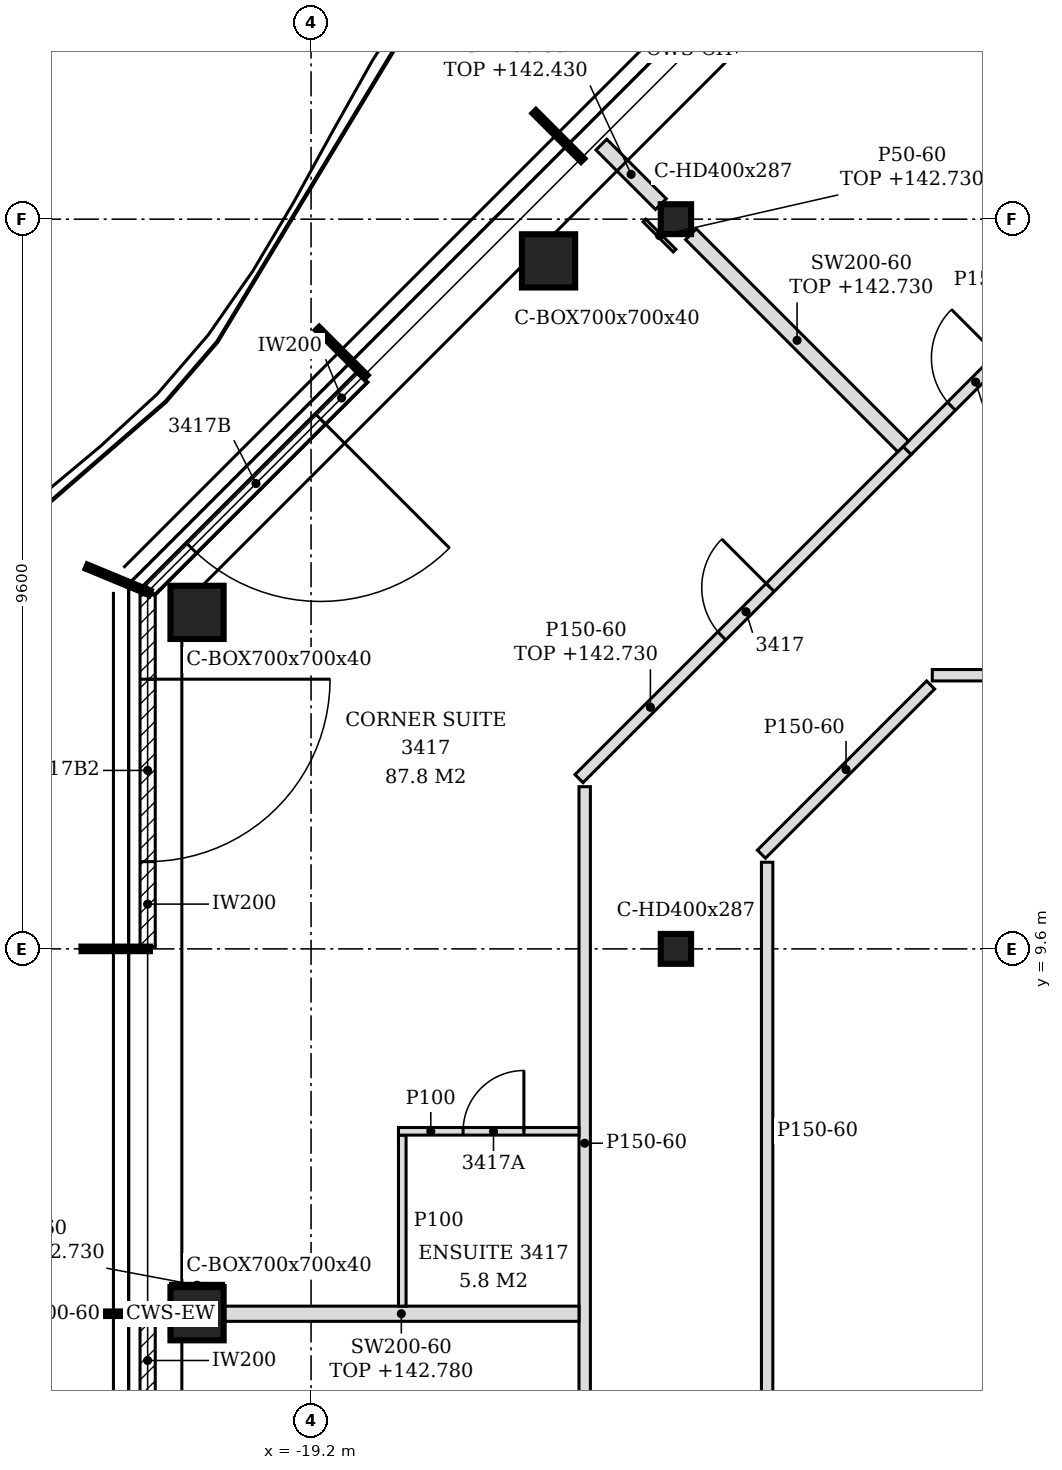
"""IFC4 building model, lengths in metres.
Left out: names, types, materials, properties, quantities, classifications, styles, units other than length and angle.
Written with IfcOpenShell. Run it as: python <this file> out.ifc"""

import sys

from ifc_helpers import new_model, si_unit, direction, frame, frame_2d, origin, origin_2d, place, context, subcontext, project, spatial, polyline, rectangle, hollow_rectangle, i_section, outline, extrude, element, fill, save


model = new_model("IFC4")
c1 = context("Model", 3, precision=1e-05, world=origin(), true_north=direction((0.0, 1.0)))
c2 = subcontext(c1, "Body", "Model", "MODEL_VIEW")
j1 = project(units=[si_unit("LENGTHUNIT", "METRE"), si_unit("PLANEANGLEUNIT", "RADIAN")], contexts=[c1])
p1 = place(None, origin())
s1 = spatial("IfcSite", under=j1, at=p1, CompositionType="ELEMENT")
p2 = place(p1, origin())
s2 = spatial("IfcBuilding", under=s1, at=p2, CompositionType="ELEMENT")
p3 = place(p2, frame((0.0, 0.0, 139.8)))
s3 = spatial("IfcBuildingStorey", under=s2, at=p3, CompositionType="ELEMENT", Elevation=139.8)
for number, where, z_axis, x_axis in (
    (1, (-16.076, 18.652, -0.15), (0.0, 0.0, 1.0), (1.0, 0.0, 0.0)),
    (2, (-20.7, 14.027, -0.15), (0.0, 0.0, 1.0), (1.0, 0.0, 0.0)),
    (3, (-20.7, 4.8, -0.15), (0.0, 0.0, 1.0), (1.0, 0.0, 0.0)),
):
    element("IfcColumn", number, at=place(p3, frame(where, z_axis=z_axis, x_axis=x_axis)), inside=s3, PredefinedType="COLUMN", context=c2, shape_type="SweptSolid", body=[
        extrude(hollow_rectangle(XDim=0.7, YDim=0.7, WallThickness=0.04, at=origin_2d()), origin(), (0.0, 0.0, 1.0), 3.6),
    ])
for number, where, z_axis, x_axis in (
    (4, (-14.4, 9.6, -0.15), (0.0, 0.0, 1.0), (1.0, 0.0, 0.0)),
    (5, (-14.4, 19.2, -0.15), (0.0, 0.0, 1.0), (1.0, 0.0, 0.0)),
):
    element("IfcColumn", number, at=place(p3, frame(where, z_axis=z_axis, x_axis=x_axis)), inside=s3, PredefinedType="COLUMN", context=c2, shape_type="SweptSolid", body=[
        extrude(i_section(OverallWidth=0.399, OverallDepth=0.393, WebThickness=0.023, FlangeThickness=0.037, FilletRadius=0.015, at=origin_2d()), origin(), (0.0, 0.0, 1.0), 3.6),
    ])
p4 = place(p3, frame((-18.521, 17.126, 0.0), z_axis=(0.0, 0.0, 1.0), x_axis=(-0.707106781187, -0.707106781187, 0.0)))
e6 = element("IfcWall", 6, at=p4, inside=s3, PredefinedType="NOTDEFINED", context=c2, shape_type="SweptSolid", body=[
    extrude(rectangle(XDim=3.962, YDim=0.2, at=frame_2d((1.981, 0.0))), origin(), (0.0, 0.0, 1.0), 3.45),
])
p5 = place(p4, frame((0.786, 0.0, 0.0)))
e7 = element("IfcOpeningElement", 7, at=p5, cuts=e6, PredefinedType="OPENING", context=c2, shape_type="SweptSolid", body=[
    extrude(rectangle(XDim=2.4, YDim=2.4, at=frame_2d((1.2, 1.2))), frame((0.0, 0.11, 0.0), z_axis=(0.0, -1.0, 0.0), x_axis=(1.0, 0.0, 0.0)), (0.0, 0.0, 1.0), 0.22),
])
p6 = place(p3, frame((-21.35, 14.256, 0.0), z_axis=(0.0, 0.0, 1.0), x_axis=(0.0, -1.0, 0.0)))
e8 = element("IfcWall", 8, at=p6, inside=s3, PredefinedType="NOTDEFINED", context=c2, shape_type="SweptSolid", body=[
    extrude(rectangle(XDim=4.626, YDim=0.2, at=frame_2d((2.313, 0.0))), origin(), (0.0, 0.0, 1.0), 3.45),
])
p7 = place(p6, frame((1.108, 0.0, 0.0)))
e9 = element("IfcOpeningElement", 9, at=p7, cuts=e8, PredefinedType="OPENING", context=c2, shape_type="SweptSolid", body=[
    extrude(rectangle(XDim=2.4, YDim=2.4, at=frame_2d((1.2, 1.2))), frame((0.0, 0.11, 0.0), z_axis=(0.0, -1.0, 0.0), x_axis=(1.0, 0.0, 0.0)), (0.0, 0.0, 1.0), 0.22),
])
p8 = place(p3, frame((-21.35, 4.77, 0.0), z_axis=(0.0, 0.0, 1.0), x_axis=(0.0, -1.0, 0.0)))
e10 = element("IfcWall", 10, at=p8, inside=s3, PredefinedType="NOTDEFINED", context=c2, shape_type="SweptSolid", body=[
    extrude(rectangle(XDim=4.74, YDim=0.2, at=frame_2d((2.37, 0.0))), origin(), (0.0, 0.0, 1.0), 3.45),
])
p9 = place(p8, frame((1.17, 0.0, 0.0)))
e11 = element("IfcOpeningElement", 11, at=p9, cuts=e10, PredefinedType="OPENING", context=c2, shape_type="SweptSolid", body=[
    extrude(rectangle(XDim=2.4, YDim=2.4, at=frame_2d((1.2, 1.2))), frame((0.0, 0.11, 0.0), z_axis=(0.0, -1.0, 0.0), x_axis=(1.0, 0.0, 0.0)), (0.0, 0.0, 1.0), 0.22),
])
p10 = place(p3, frame((-15.6, -1.1, 0.0), z_axis=(0.0, 0.0, 1.0), x_axis=(0.0, 1.0, 0.0)))
e12 = element("IfcWall", 12, at=p10, inside=s3, PredefinedType="PARTITIONING", context=c2, shape_type="SweptSolid", body=[
    extrude(outline(polyline([(0.0, 0.0), (12.834, 0.0), (12.834, 3.45), (10.795, 3.45), (10.793, 2.98), (10.605, 2.98), (10.603, 3.45), (5.995, 3.45), (5.993, 2.98), (5.805, 2.98), (5.803, 3.45), (1.195, 3.45), (1.193, 2.98), (1.005, 2.98), (1.003, 3.45), (0.0, 3.45), (0.0, 0.0)])), frame((0.0, 0.075, 0.0), z_axis=(0.0, -1.0, 0.0), x_axis=(1.0, 0.0, 0.0)), (0.0, 0.0, 1.0), 0.15),
])
p11 = place(p10, frame((2.553, 0.0, 0.0)))
e13 = element("IfcOpeningElement", 13, at=p11, cuts=e12, PredefinedType="OPENING", context=c2, shape_type="SweptSolid", body=[
    extrude(rectangle(XDim=0.9, YDim=2.1, at=frame_2d((0.45, 1.05))), frame((0.0, 0.085, 0.0), z_axis=(0.0, -1.0, 0.0), x_axis=(1.0, 0.0, 0.0)), (0.0, 0.0, 1.0), 0.17),
])
p12 = place(p3, frame((-13.2, 3.675, 0.0), z_axis=(0.0, 0.0, 1.0), x_axis=(0.0, 1.0, 0.0)))
e14 = element("IfcWall", 14, at=p12, inside=s3, PredefinedType="PARTITIONING", context=c2, shape_type="SweptSolid", body=[
    extrude(outline(polyline([(0.0, 0.0), (7.065, 0.0), (7.065, 3.45), (6.025, 3.45), (6.023, 2.93), (5.825, 2.93), (5.823, 3.45), (1.225, 3.45), (1.223, 2.93), (1.025, 2.93), (1.023, 3.45), (0.0, 3.45), (0.0, 0.0)])), frame((0.0, 0.075, 0.0), z_axis=(0.0, -1.0, 0.0), x_axis=(1.0, 0.0, 0.0)), (0.0, 0.0, 1.0), 0.15),
])
p13 = place(p3, frame((-21.25, 4.8, 0.0), z_axis=(0.0, 0.0, 1.0), x_axis=(1.0, 0.0, 0.0)))
e15 = element("IfcWall", 15, at=p13, inside=s3, PredefinedType="PARTITIONING", context=c2, shape_type="SweptSolid", body=[
    extrude(rectangle(XDim=0.2, YDim=0.2, at=frame_2d((0.1, 0.0))), origin(), (0.0, 0.0, 1.0), 3.45),
])
p14 = place(p3, frame((-20.35, 4.8, 0.0), z_axis=(0.0, 0.0, 1.0), x_axis=(1.0, 0.0, 0.0)))
e16 = element("IfcWall", 16, at=p14, inside=s3, PredefinedType="PARTITIONING", context=c2, shape_type="SweptSolid", body=[
    extrude(rectangle(XDim=4.675, YDim=0.2, at=frame_2d((2.337, 0.0))), origin(), (0.0, 0.0, 1.0), 2.98),
])
p15 = place(p3, frame((-18.0, 4.9, 0.0), z_axis=(0.0, 0.0, 1.0), x_axis=(0.0, 1.0, 0.0)))
e17 = element("IfcWall", 17, at=p15, inside=s3, PredefinedType="PARTITIONING", context=c2, shape_type="SweptSolid", body=[
    extrude(rectangle(XDim=2.25, YDim=0.1, at=frame_2d((1.125, 0.0))), origin(), (0.0, 0.0, 1.0), 3.45),
])
p16 = place(p3, frame((-18.05, 7.2, 0.0), z_axis=(0.0, 0.0, 1.0), x_axis=(1.0, 0.0, 0.0)))
e18 = element("IfcWall", 18, at=p16, inside=s3, PredefinedType="PARTITIONING", context=c2, shape_type="SweptSolid", body=[
    extrude(rectangle(XDim=2.375, YDim=0.1, at=frame_2d((1.188, 0.0))), origin(), (0.0, 0.0, 1.0), 3.45),
])
p17 = place(p16, frame((0.85, 0.0, 0.0)))
e19 = element("IfcOpeningElement", 19, at=p17, cuts=e18, PredefinedType="OPENING", context=c2, shape_type="SweptSolid", body=[
    extrude(rectangle(XDim=0.8, YDim=2.1, at=frame_2d((0.4, 1.05))), frame((0.0, 0.06, 0.0), z_axis=(0.0, -1.0, 0.0), x_axis=(1.0, 0.0, 0.0)), (0.0, 0.0, 1.0), 0.12),
])
p18 = place(p3, frame((-13.275, 10.846, 0.0), z_axis=(0.0, 0.0, 1.0), x_axis=(0.707068002674, 0.707145557572, 0.0)))
e20 = element("IfcWall", 20, at=p18, inside=s3, PredefinedType="PARTITIONING", context=c2, shape_type="SweptSolid", body=[
    extrude(rectangle(XDim=3.148, YDim=0.15, at=frame_2d((1.574, 0.0))), origin(), (0.0, 0.0, 1.0), 3.45),
])
p19 = place(p3, frame((-15.675, 11.84, 0.0), z_axis=(0.0, 0.0, 1.0), x_axis=(0.707206735496, 0.707006812746, 0.0)))
e21 = element("IfcWall", 21, at=p19, inside=s3, PredefinedType="PARTITIONING", context=c2, shape_type="SweptSolid", body=[
    extrude(rectangle(XDim=6.106, YDim=0.15, at=frame_2d((3.053, 0.0))), origin(), (0.0, 0.0, 1.0), 2.93),
])
p20 = place(p19, frame((2.656, 0.0, 0.0)))
e22 = element("IfcOpeningElement", 22, at=p20, cuts=e21, PredefinedType="OPENING", context=c2, shape_type="SweptSolid", body=[
    extrude(rectangle(XDim=0.9, YDim=2.1, at=frame_2d((0.45, 1.05))), frame((0.0, 0.085, 0.0), z_axis=(0.0, -1.0, 0.0), x_axis=(1.0, 0.0, 0.0)), (0.0, 0.0, 1.0), 0.17),
])
p21 = place(p3, frame((-11.027, 13.2, 0.0), z_axis=(0.0, 0.0, 1.0), x_axis=(1.0, 0.0, 0.0)))
e23 = element("IfcWall", 23, at=p21, inside=s3, PredefinedType="PARTITIONING", context=c2, shape_type="SweptSolid", body=[
    extrude(rectangle(XDim=4.212, YDim=0.15, at=frame_2d((2.106, 0.0))), origin(), (0.0, 0.0, 1.0), 3.45),
])
p22 = place(p3, frame((-11.357, 16.157, 0.0), z_axis=(0.0, 0.0, 1.0), x_axis=(0.707106781187, 0.707106781187, 0.0)))
e24 = element("IfcWall", 24, at=p22, inside=s3, PredefinedType="PARTITIONING", context=c2, shape_type="SweptSolid", body=[
    extrude(rectangle(XDim=3.071, YDim=0.15, at=frame_2d((1.535, 0.0))), origin(), (0.0, 0.0, 1.0), 3.45),
])
p23 = place(p22, frame((0.823, 0.0, 0.0)))
e25 = element("IfcOpeningElement", 25, at=p23, cuts=e24, PredefinedType="OPENING", context=c2, shape_type="SweptSolid", body=[
    extrude(rectangle(XDim=0.9, YDim=2.1, at=frame_2d((0.45, 1.05))), frame((0.0, 0.085, 0.0), z_axis=(0.0, -1.0, 0.0), x_axis=(1.0, 0.0, 0.0)), (0.0, 0.0, 1.0), 0.17),
])
p24 = place(p3, frame((-11.41, 16.21, 0.0), z_axis=(0.0, 0.0, 1.0), x_axis=(-0.707106781187, 0.707106781187, 0.0)))
e26 = element("IfcWall", 26, at=p24, inside=s3, PredefinedType="PARTITIONING", context=c2, shape_type="SweptSolid", body=[
    extrude(rectangle(XDim=3.948, YDim=0.2, at=frame_2d((1.974, 0.0))), origin(), (0.0, 0.0, 1.0), 2.93),
])
p25 = place(p3, frame((-14.598, 19.398, 0.0), z_axis=(0.0, 0.0, 1.0), x_axis=(-0.707106781187, 0.707106781187, 0.0)))
e27 = element("IfcWall", 27, at=p25, inside=s3, PredefinedType="PARTITIONING", context=c2, shape_type="SweptSolid", body=[
    extrude(rectangle(XDim=1.107, YDim=0.2, at=frame_2d((0.554, 0.0))), origin(), (0.0, 0.0, 1.0), 2.63),
])
p26 = place(p3, frame((-9.542, 21.367, 0.0), z_axis=(0.0, 0.0, 1.0), x_axis=(-0.707217500167, 0.706996044867, 0.0)))
e28 = element("IfcWall", 28, at=p26, inside=s3, PredefinedType="PARTITIONING", context=c2, shape_type="SweptSolid", body=[
    extrude(rectangle(XDim=2.205, YDim=0.2, at=frame_2d((1.103, 0.0))), origin(), (0.0, 0.0, 1.0), 3.45),
])
p27 = place(p3, frame((-21.05, 5.175, 0.0), z_axis=(0.0, 0.0, 1.0), x_axis=(1.0, 0.0, 0.0)))
e29 = element("IfcWall", 29, at=p27, inside=s3, PredefinedType="PARTITIONING", context=c2, shape_type="SweptSolid", body=[
    extrude(rectangle(XDim=0.7, YDim=0.05, at=frame_2d((0.35, 0.0))), origin(), (0.0, 0.0, 1.0), 2.93),
])
p28 = place(p3, frame((-14.418, 18.786, 0.0), z_axis=(0.0, 0.0, 1.0), x_axis=(-0.707106781187, 0.707106781187, 0.0)))
e30 = element("IfcWall", 30, at=p28, inside=s3, PredefinedType="PARTITIONING", context=c2, shape_type="SweptSolid", body=[
    extrude(rectangle(XDim=0.56, YDim=0.05, at=frame_2d((0.28, 0.0))), origin(), (0.0, 0.0, 1.0), 2.93),
])
p29 = place(p5, origin())
e31 = element("IfcDoor", 31, at=p29, inside=s3, OperationType="SINGLE_SWING_LEFT", PredefinedType="DOOR", context=c2, shape_type="SweptSolid", body=[
    extrude(rectangle(XDim=2.4, YDim=2.4, at=frame_2d((1.2, 1.2))), frame((0.0, 0.025, 0.0), z_axis=(0.0, -1.0, 0.0), x_axis=(1.0, 0.0, 0.0)), (0.0, 0.0, 1.0), 0.05),
])
fill(e7, e31)
p30 = place(p7, origin())
e32 = element("IfcDoor", 32, at=p30, inside=s3, OperationType="SINGLE_SWING_LEFT", PredefinedType="DOOR", context=c2, shape_type="SweptSolid", body=[
    extrude(rectangle(XDim=2.4, YDim=2.4, at=frame_2d((1.2, 1.2))), frame((0.0, 0.025, 0.0), z_axis=(0.0, -1.0, 0.0), x_axis=(1.0, 0.0, 0.0)), (0.0, 0.0, 1.0), 0.05),
])
fill(e9, e32)
p31 = place(p23, origin())
e33 = element("IfcDoor", 33, at=p31, inside=s3, OperationType="SINGLE_SWING_RIGHT", PredefinedType="DOOR", context=c2, shape_type="SweptSolid", body=[
    extrude(rectangle(XDim=0.9, YDim=2.1, at=frame_2d((0.45, 1.05))), frame((0.0, 0.025, 0.0), z_axis=(0.0, -1.0, 0.0), x_axis=(1.0, 0.0, 0.0)), (0.0, 0.0, 1.0), 0.05),
])
fill(e25, e33)
p32 = place(p20, origin())
e34 = element("IfcDoor", 34, at=p32, inside=s3, OperationType="SINGLE_SWING_RIGHT", PredefinedType="DOOR", context=c2, shape_type="SweptSolid", body=[
    extrude(rectangle(XDim=0.9, YDim=2.1, at=frame_2d((0.45, 1.05))), frame((0.0, 0.025, 0.0), z_axis=(0.0, -1.0, 0.0), x_axis=(1.0, 0.0, 0.0)), (0.0, 0.0, 1.0), 0.05),
])
fill(e22, e34)
p33 = place(p17, origin())
e35 = element("IfcDoor", 35, at=p33, inside=s3, OperationType="SINGLE_SWING_RIGHT", PredefinedType="DOOR", context=c2, shape_type="SweptSolid", body=[
    extrude(rectangle(XDim=0.8, YDim=2.1, at=frame_2d((0.4, 1.05))), frame((0.0, 0.025, 0.0), z_axis=(0.0, -1.0, 0.0), x_axis=(1.0, 0.0, 0.0)), (0.0, 0.0, 1.0), 0.05),
])
fill(e19, e35)
save(model, sys.argv[1])
